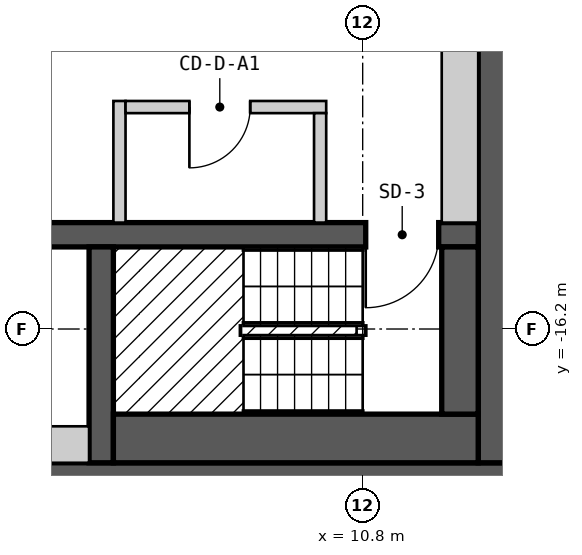
"""IFC4 building model, lengths in metres.
Left out: names, types, materials, properties, quantities, classifications, styles, units other than length and angle.
Written with IfcOpenShell. Run it as: python <this file> out.ifc"""

import sys

from ifc_helpers import new_model, si_unit, direction, frame, frame_2d, origin, place, context, subcontext, project, spatial, rectangle, extrude, element, fill, save


model = new_model("IFC4")
c1 = context("Model", 3, precision=1e-05, world=origin(), true_north=direction((0.0, 1.0)))
c2 = subcontext(c1, "Body", "Model", "MODEL_VIEW")
j1 = project(units=[si_unit("LENGTHUNIT", "METRE"), si_unit("PLANEANGLEUNIT", "RADIAN")], contexts=[c1])
p1 = place(None, origin())
s1 = spatial("IfcSite", under=j1, at=p1, CompositionType="ELEMENT")
p2 = place(p1, origin())
s2 = spatial("IfcBuilding", under=s1, at=p2, CompositionType="ELEMENT")
p3 = place(p2, frame((0.0, 0.0, 190.2)))
s3 = spatial("IfcBuildingStorey", under=s2, at=p3, CompositionType="ELEMENT", Elevation=190.2)
p4 = place(p3, frame((-13.3, -18.7, 0.0), z_axis=(0.0, 0.0, 1.0), x_axis=(1.0, 0.0, 0.0)))
e1 = element("IfcWall", 1, at=p4, inside=s3, PredefinedType="SHEAR", context=c2, shape_type="SweptSolid", body=[
    extrude(rectangle(XDim=26.6, YDim=0.6, at=frame_2d((13.3, 0.0))), origin(), (0.0, 0.0, 1.0), 2.7),
])
p5 = place(p3, frame((13.0, -18.4, 0.0), z_axis=(0.0, 0.0, 1.0), x_axis=(0.0, 1.0, 0.0)))
e2 = element("IfcWall", 2, at=p5, inside=s3, PredefinedType="SHEAR", context=c2, shape_type="SweptSolid", body=[
    extrude(rectangle(XDim=12.8, YDim=0.6, at=frame_2d((6.4, 0.0))), origin(), (0.0, 0.0, 1.0), 2.7),
])
p6 = place(p3, frame((-12.7, -14.65, 0.0), z_axis=(0.0, 0.0, 1.0), x_axis=(1.0, 0.0, 0.0)))
e3 = element("IfcWall", 3, at=p6, inside=s3, PredefinedType="SHEAR", context=c2, shape_type="SweptSolid", body=[
    extrude(rectangle(XDim=25.4, YDim=0.4, at=frame_2d((12.7, 0.0))), origin(), (0.0, 0.0, 1.0), 2.7),
])
p7 = place(p6, frame((1.9, 0.0, 0.0), z_axis=(0.0, 0.0, 1.0), x_axis=(-1.0, 0.0, 0.0)))
e4 = element("IfcOpeningElement", 4, at=p7, cuts=e3, PredefinedType="OPENING", context=c2, shape_type="SweptSolid", body=[
    extrude(rectangle(XDim=1.2, YDim=2.1, at=frame_2d((0.6, 1.05))), frame((0.0, 0.21, 0.0), z_axis=(0.0, -1.0, 0.0), x_axis=(1.0, 0.0, 0.0)), (0.0, 0.0, 1.0), 0.42),
])
p8 = place(p6, frame((24.75, 0.0, 0.0), z_axis=(0.0, 0.0, 1.0), x_axis=(-1.0, 0.0, 0.0)))
e5 = element("IfcOpeningElement", 5, at=p8, cuts=e3, PredefinedType="OPENING", context=c2, shape_type="SweptSolid", body=[
    extrude(rectangle(XDim=1.2, YDim=2.1, at=frame_2d((0.6, 1.05))), frame((0.0, 0.21, 0.0), z_axis=(0.0, -1.0, 0.0), x_axis=(1.0, 0.0, 0.0)), (0.0, 0.0, 1.0), 0.42),
])
p9 = place(p6, frame((8.6, 0.0, 0.0), z_axis=(0.0, 0.0, 1.0), x_axis=(-1.0, 0.0, 0.0)))
e6 = element("IfcOpeningElement", 6, at=p9, cuts=e3, PredefinedType="OPENING", context=c2, shape_type="SweptSolid", body=[
    extrude(rectangle(XDim=1.0, YDim=2.1, at=frame_2d((0.5, 1.05))), frame((0.0, 0.21, 0.0), z_axis=(0.0, -1.0, 0.0), x_axis=(1.0, 0.0, 0.0)), (0.0, 0.0, 1.0), 0.42),
])
p10 = place(p6, frame((11.35, 0.0, 0.0), z_axis=(0.0, 0.0, 1.0), x_axis=(-1.0, 0.0, 0.0)))
e7 = element("IfcOpeningElement", 7, at=p10, cuts=e3, PredefinedType="OPENING", context=c2, shape_type="SweptSolid", body=[
    extrude(rectangle(XDim=0.9, YDim=2.1, at=frame_2d((0.45, 1.05))), frame((0.0, 0.21, 0.0), z_axis=(0.0, -1.0, 0.0), x_axis=(1.0, 0.0, 0.0)), (0.0, 0.0, 1.0), 0.42),
])
p11 = place(p6, frame((14.15, 0.0, 0.0), z_axis=(0.0, 0.0, 1.0), x_axis=(-1.0, 0.0, 0.0)))
e8 = element("IfcOpeningElement", 8, at=p11, cuts=e3, PredefinedType="OPENING", context=c2, shape_type="SweptSolid", body=[
    extrude(rectangle(XDim=1.0, YDim=2.1, at=frame_2d((0.5, 1.05))), frame((0.0, 0.21, 0.0), z_axis=(0.0, -1.0, 0.0), x_axis=(1.0, 0.0, 0.0)), (0.0, 0.0, 1.0), 0.42),
])
p12 = place(p6, frame((17.75, 0.0, 0.0), z_axis=(0.0, 0.0, 1.0), x_axis=(-1.0, 0.0, 0.0)))
e9 = element("IfcOpeningElement", 9, at=p12, cuts=e3, PredefinedType="OPENING", context=c2, shape_type="SweptSolid", body=[
    extrude(rectangle(XDim=1.0, YDim=2.1, at=frame_2d((0.5, 1.05))), frame((0.0, 0.21, 0.0), z_axis=(0.0, -1.0, 0.0), x_axis=(1.0, 0.0, 0.0)), (0.0, 0.0, 1.0), 0.42),
])
p13 = place(p3, frame((6.5, -18.4, 0.0), z_axis=(0.0, 0.0, 1.0), x_axis=(0.0, 1.0, 0.0)))
e10 = element("IfcWall", 10, at=p13, inside=s3, PredefinedType="SHEAR", context=c2, shape_type="SweptSolid", body=[
    extrude(rectangle(XDim=3.55, YDim=0.4, at=frame_2d((1.775, 0.0))), origin(), (0.0, 0.0, 1.0), 2.7),
])
p14 = place(p3, frame((-6.3, -18.1, 0.0), z_axis=(0.0, 0.0, 1.0), x_axis=(1.0, 0.0, 0.0)))
e11 = element("IfcWall", 11, at=p14, inside=s3, PredefinedType="PARTITIONING", context=c2, shape_type="SweptSolid", body=[
    extrude(rectangle(XDim=12.6, YDim=0.6, at=frame_2d((6.3, 0.0))), origin(), (0.0, 0.0, 1.0), 2.7),
])
p15 = place(p3, frame((6.7, -18.0, 0.0), z_axis=(0.0, 0.0, 1.0), x_axis=(1.0, 0.0, 0.0)))
e12 = element("IfcWall", 12, at=p15, inside=s3, PredefinedType="SOLIDWALL", context=c2, shape_type="SweptSolid", body=[
    extrude(rectangle(XDim=6.0, YDim=0.8, at=frame_2d((3.0, 0.0))), origin(), (0.0, 0.0, 1.0), 2.7),
])
p16 = place(p3, frame((6.8, -14.45, 0.0), z_axis=(0.0, 0.0, 1.0), x_axis=(0.0, 1.0, 0.0)))
e13 = element("IfcWall", 13, at=p16, inside=s3, PredefinedType="PARTITIONING", context=c2, shape_type="SweptSolid", body=[
    extrude(rectangle(XDim=2.0, YDim=0.2, at=frame_2d((1.0, 0.0))), origin(), (0.0, 0.0, 1.0), 2.7),
])
p17 = place(p3, frame((6.9, -12.55, 0.0), z_axis=(0.0, 0.0, 1.0), x_axis=(1.0, 0.0, 0.0)))
e14 = element("IfcWall", 14, at=p17, inside=s3, PredefinedType="PARTITIONING", context=c2, shape_type="SweptSolid", body=[
    extrude(rectangle(XDim=3.3, YDim=0.2, at=frame_2d((1.65, 0.0))), origin(), (0.0, 0.0, 1.0), 2.7),
])
p18 = place(p17, frame((2.05, 0.0, 0.0), z_axis=(0.0, 0.0, 1.0), x_axis=(-1.0, 0.0, 0.0)))
e15 = element("IfcOpeningElement", 15, at=p18, cuts=e14, PredefinedType="OPENING", context=c2, shape_type="SweptSolid", body=[
    extrude(rectangle(XDim=1.0, YDim=2.1, at=frame_2d((0.5, 1.05))), frame((0.0, 0.11, 0.0), z_axis=(0.0, -1.0, 0.0), x_axis=(1.0, 0.0, 0.0)), (0.0, 0.0, 1.0), 0.22),
])
p19 = place(p3, frame((10.1, -14.45, 0.0), z_axis=(0.0, 0.0, 1.0), x_axis=(0.0, 1.0, 0.0)))
e16 = element("IfcWall", 16, at=p19, inside=s3, PredefinedType="PARTITIONING", context=c2, shape_type="SweptSolid", body=[
    extrude(rectangle(XDim=1.8, YDim=0.2, at=frame_2d((0.9, 0.0))), origin(), (0.0, 0.0, 1.0), 2.7),
])
p20 = place(p3, frame((12.4, -17.6, 0.0), z_axis=(0.0, 0.0, 1.0), x_axis=(0.0, 1.0, 0.0)))
e17 = element("IfcWall", 17, at=p20, inside=s3, PredefinedType="SOLIDWALL", context=c2, shape_type="SweptSolid", body=[
    extrude(rectangle(XDim=2.75, YDim=0.6, at=frame_2d((1.375, 0.0))), origin(), (0.0, 0.0, 1.0), 2.7),
])
p21 = place(p3, frame((12.4, -14.45, 0.0), z_axis=(0.0, 0.0, 1.0), x_axis=(0.0, 1.0, 0.0)))
e18 = element("IfcWall", 18, at=p21, inside=s3, PredefinedType="PARTITIONING", context=c2, shape_type="SweptSolid", body=[
    extrude(rectangle(XDim=8.25, YDim=0.6, at=frame_2d((4.125, 0.0))), origin(), (0.0, 0.0, 1.0), 2.7),
])
p22 = place(p8, origin())
e19 = element("IfcDoor", 19, at=p22, inside=s3, OperationType="SINGLE_SWING_RIGHT", PredefinedType="DOOR", context=c2, shape_type="SweptSolid", body=[
    extrude(rectangle(XDim=1.2, YDim=2.1, at=frame_2d((0.6, 1.05))), frame((0.0, 0.025, 0.0), z_axis=(0.0, -1.0, 0.0), x_axis=(1.0, 0.0, 0.0)), (0.0, 0.0, 1.0), 0.05),
])
fill(e5, e19)
p23 = place(p18, origin())
e20 = element("IfcDoor", 20, at=p23, inside=s3, OperationType="SINGLE_SWING_RIGHT", PredefinedType="DOOR", context=c2, shape_type="SweptSolid", body=[
    extrude(rectangle(XDim=1.0, YDim=2.1, at=frame_2d((0.5, 1.05))), frame((0.0, 0.025, 0.0), z_axis=(0.0, -1.0, 0.0), x_axis=(1.0, 0.0, 0.0)), (0.0, 0.0, 1.0), 0.05),
])
fill(e15, e20)
save(model, sys.argv[1])
